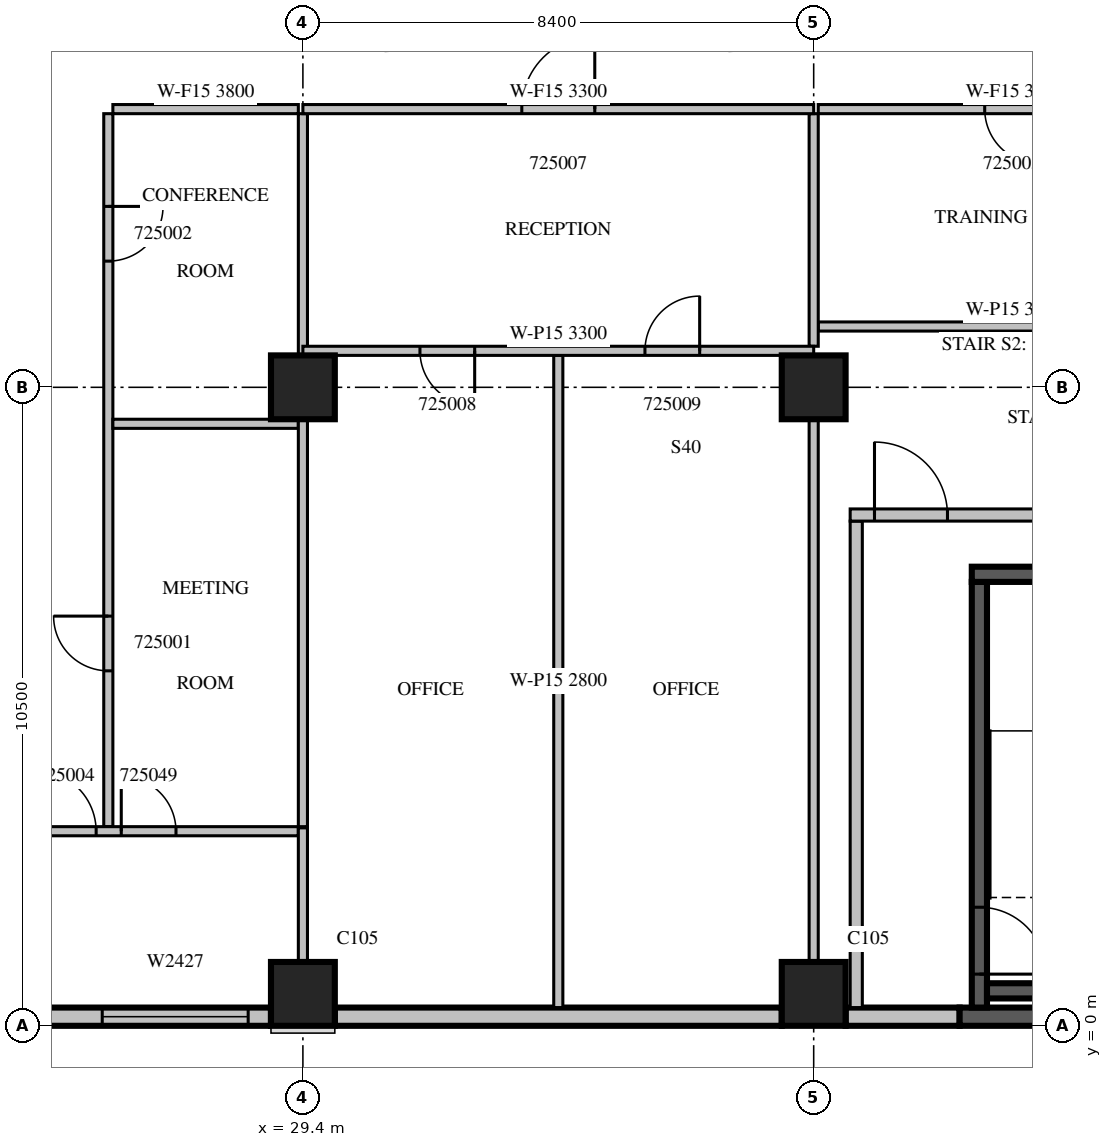
"""IFC4 building model, lengths in metres.
Left out: names, types, materials, properties, quantities, classifications, styles, units other than length and angle.
Written with IfcOpenShell. Run it as: python <this file> out.ifc"""

import sys

from ifc_helpers import new_model, si_unit, direction, frame, frame_2d, origin, origin_2d, place, context, subcontext, project, spatial, rectangle, extrude, source, transform, mapped, element, fill, save


model = new_model("IFC4")
c1 = context("Model", 3, precision=1e-05, world=origin(), true_north=direction((0.0, 1.0)))
c2 = subcontext(c1, "Body", "Model", "MODEL_VIEW")
j1 = project(units=[si_unit("LENGTHUNIT", "METRE"), si_unit("PLANEANGLEUNIT", "RADIAN")], contexts=[c1])
p1 = place(None, origin())
s1 = spatial("IfcSite", under=j1, at=p1, CompositionType="ELEMENT")
p2 = place(p1, origin())
s2 = spatial("IfcBuilding", under=s1, at=p2, CompositionType="ELEMENT")
p3 = place(p2, frame((0.0, 0.0, 116.1)))
s3 = spatial("IfcBuildingStorey", under=s2, at=p3, CompositionType="ELEMENT", Elevation=116.1)
m1 = source(origin(), c2, "Body", "SweptSolid", [
    extrude(rectangle(XDim=1.05, YDim=1.05, at=origin_2d()), origin(), (0.0, 0.0, 1.0), 4.2),
])
for number, where, z_axis, x_axis in (
    (1, (29.4, 0.525, 0.0), (0.0, 0.0, 1.0), (1.0, 0.0, 0.0)),
    (2, (37.8, 0.525, 0.0), (0.0, 0.0, 1.0), (1.0, 0.0, 0.0)),
    (3, (29.4, 10.5, 0.0), (0.0, 0.0, 1.0), (1.0, 0.0, 0.0)),
    (4, (37.8, 10.5, 0.0), (0.0, 0.0, 1.0), (1.0, 0.0, 0.0)),
):
    element("IfcColumn", number, at=place(p3, frame(where, z_axis=z_axis, x_axis=x_axis)), inside=s3, PredefinedType="COLUMN", context=c2, shape_type="MappedRepresentation", body=[
        mapped(m1, transform((0.0, 0.0, 0.0), scale=1.0)),
    ])
m2 = source(origin(), c2, "Body", "SweptSolid", [
    extrude(rectangle(XDim=7.35, YDim=0.3, at=frame_2d((3.675, 0.0))), origin(), (0.0, 0.0, 1.0), 3.8),
])
p4 = place(p3, frame((21.525, 0.15, 0.0), z_axis=(0.0, 0.0, 1.0), x_axis=(1.0, 0.0, 0.0)))
e5 = element("IfcWall", 5, at=p4, inside=s3, PredefinedType="STANDARD", context=c2, shape_type="MappedRepresentation", body=[
    mapped(m2, transform((0.0, 0.0, 0.0), scale=1.0)),
])
m3 = source(origin(), c2, "Body", "SweptSolid", [
    extrude(rectangle(XDim=2.4, YDim=2.7, at=frame_2d((1.2, 1.35))), frame((0.0, 0.16, 0.0), z_axis=(0.0, -1.0, 0.0), x_axis=(1.0, 0.0, 0.0)), (0.0, 0.0, 1.0), 0.32),
])
p5 = place(p4, frame((4.575, 0.0, 0.6)))
e6 = element("IfcOpeningElement", 6, at=p5, cuts=e5, PredefinedType="OPENING", context=c2, shape_type="MappedRepresentation", body=[
    mapped(m3, transform((0.0, 0.0, 0.0), scale=1.0)),
])
m4 = source(origin(), c2, "Body", "SweptSolid", [
    extrude(rectangle(XDim=1.0, YDim=2.1, at=frame_2d((0.5, 1.05))), frame((0.0, 0.16, 0.0), z_axis=(0.0, -1.0, 0.0), x_axis=(1.0, 0.0, 0.0)), (0.0, 0.0, 1.0), 0.32),
])
p6 = place(p4, frame((1.075, 0.0, 0.0)))
e7 = element("IfcOpeningElement", 7, at=p6, cuts=e5, PredefinedType="OPENING", context=c2, shape_type="MappedRepresentation", body=[
    mapped(m4, transform((0.0, 0.0, 0.0), scale=1.0)),
])
p7 = place(p3, frame((29.925, 0.15, 0.0), z_axis=(0.0, 0.0, 1.0), x_axis=(1.0, 0.0, 0.0)))
e8 = element("IfcWall", 8, at=p7, inside=s3, PredefinedType="STANDARD", context=c2, shape_type="MappedRepresentation", body=[
    mapped(m2, transform((0.0, 0.0, 0.0), scale=1.0)),
])
m5 = source(origin(), c2, "Body", "SweptSolid", [
    extrude(rectangle(XDim=1.875, YDim=0.3, at=frame_2d((0.938, 0.0))), origin(), (0.0, 0.0, 1.0), 3.8),
])
p8 = place(p3, frame((38.325, 0.15, 0.0), z_axis=(0.0, 0.0, 1.0), x_axis=(1.0, 0.0, 0.0)))
e9 = element("IfcWall", 9, at=p8, inside=s3, PredefinedType="STANDARD", context=c2, shape_type="MappedRepresentation", body=[
    mapped(m5, transform((0.0, 0.0, 0.0), scale=1.0)),
])
m6 = source(origin(), c2, "Body", "SweptSolid", [
    extrude(rectangle(XDim=3.8, YDim=0.3, at=frame_2d((1.9, 0.0))), origin(), (0.0, 0.0, 1.0), 3.8),
])
p9 = place(p3, frame((40.2, 0.15, 0.0), z_axis=(0.0, 0.0, 1.0), x_axis=(1.0, 0.0, 0.0)))
e10 = element("IfcWall", 10, at=p9, inside=s3, PredefinedType="SOLIDWALL", context=c2, shape_type="MappedRepresentation", body=[
    mapped(m6, transform((0.0, 0.0, 0.0), scale=1.0)),
])
m7 = source(origin(), c2, "Body", "SweptSolid", [
    extrude(rectangle(XDim=7.0, YDim=0.25, at=frame_2d((3.5, 0.0))), origin(), (0.0, 0.0, 1.0), 3.8),
])
p10 = place(p3, frame((40.525, 0.3, 0.0), z_axis=(0.0, 0.0, 1.0), x_axis=(0.0, 1.0, 0.0)))
e11 = element("IfcWall", 11, at=p10, inside=s3, PredefinedType="SOLIDWALL", context=c2, shape_type="MappedRepresentation", body=[
    mapped(m7, transform((0.0, 0.0, 0.0), scale=1.0)),
])
m8 = source(origin(), c2, "Body", "SweptSolid", [
    extrude(rectangle(XDim=1.1, YDim=2.1, at=frame_2d((0.55, 1.05))), frame((0.0, 0.135, 0.0), z_axis=(0.0, -1.0, 0.0), x_axis=(1.0, 0.0, 0.0)), (0.0, 0.0, 1.0), 0.27),
])
p11 = place(p10, frame((0.55, 0.0, 0.0)))
e12 = element("IfcOpeningElement", 12, at=p11, cuts=e11, PredefinedType="OPENING", context=c2, shape_type="MappedRepresentation", body=[
    mapped(m8, transform((0.0, 0.0, 0.0), scale=1.0)),
])
m9 = source(origin(), c2, "Body", "SweptSolid", [
    extrude(rectangle(XDim=3.45, YDim=0.25, at=frame_2d((1.725, 0.0))), origin(), (0.0, 0.0, 1.0), 3.8),
])
p12 = place(p3, frame((40.4, 7.425, 0.0), z_axis=(0.0, 0.0, 1.0), x_axis=(1.0, 0.0, 0.0)))
e13 = element("IfcWall", 13, at=p12, inside=s3, PredefinedType="SOLIDWALL", context=c2, shape_type="MappedRepresentation", body=[
    mapped(m9, transform((0.0, 0.0, 0.0), scale=1.0)),
])
m10 = source(origin(), c2, "Body", "SweptSolid", [
    extrude(rectangle(XDim=2.95, YDim=0.25, at=frame_2d((1.475, 0.0))), origin(), (0.0, 0.0, 1.0), 3.8),
])
p13 = place(p3, frame((40.65, 0.575, 0.0), z_axis=(0.0, 0.0, 1.0), x_axis=(1.0, 0.0, 0.0)))
e14 = element("IfcWall", 14, at=p13, inside=s3, PredefinedType="SOLIDWALL", context=c2, shape_type="MappedRepresentation", body=[
    mapped(m10, transform((0.0, 0.0, 0.0), scale=1.0)),
])
m11 = source(origin(), c2, "Body", "SweptSolid", [
    extrude(rectangle(XDim=8.0, YDim=0.2, at=frame_2d((4.0, 0.0))), origin(), (0.0, 0.0, 1.0), 3.8),
])
p14 = place(p3, frame((38.5, 0.3, 0.0), z_axis=(0.0, 0.0, 1.0), x_axis=(0.0, 1.0, 0.0)))
e15 = element("IfcWall", 15, at=p14, inside=s3, PredefinedType="PARTITIONING", context=c2, shape_type="MappedRepresentation", body=[
    mapped(m11, transform((0.0, 0.0, 0.0), scale=1.0)),
])
m12 = source(origin(), c2, "Body", "SweptSolid", [
    extrude(rectangle(XDim=5.45, YDim=0.2, at=frame_2d((2.725, 0.0))), origin(), (0.0, 0.0, 1.0), 3.8),
])
p15 = place(p3, frame((38.4, 8.4, 0.0), z_axis=(0.0, 0.0, 1.0), x_axis=(1.0, 0.0, 0.0)))
e16 = element("IfcWall", 16, at=p15, inside=s3, PredefinedType="PARTITIONING", context=c2, shape_type="MappedRepresentation", body=[
    mapped(m12, transform((0.0, 0.0, 0.0), scale=1.0)),
])
m13 = source(origin(), c2, "Body", "SweptSolid", [
    extrude(rectangle(XDim=1.2, YDim=2.1, at=frame_2d((0.6, 1.05))), frame((0.0, 0.11, 0.0), z_axis=(0.0, -1.0, 0.0), x_axis=(1.0, 0.0, 0.0)), (0.0, 0.0, 1.0), 0.22),
])
p16 = place(p15, frame((0.4, 0.0, 0.0)))
e17 = element("IfcOpeningElement", 17, at=p16, cuts=e16, PredefinedType="OPENING", context=c2, shape_type="MappedRepresentation", body=[
    mapped(m13, transform((0.0, 0.0, 0.0), scale=1.0)),
])
m14 = source(origin(), c2, "Body", "SweptSolid", [
    extrude(rectangle(XDim=0.9, YDim=2.1, at=frame_2d((0.45, 1.05))), frame((0.0, 0.11, 0.0), z_axis=(0.0, -1.0, 0.0), x_axis=(1.0, 0.0, 0.0)), (0.0, 0.0, 1.0), 0.22),
])
p17 = place(p15, frame((3.25, 0.0, 0.0)))
e18 = element("IfcOpeningElement", 18, at=p17, cuts=e16, PredefinedType="OPENING", context=c2, shape_type="MappedRepresentation", body=[
    mapped(m14, transform((0.0, 0.0, 0.0), scale=1.0)),
])
p18 = place(p3, frame((26.2, 15.0, 0.0), z_axis=(0.0, 0.0, 1.0), x_axis=(0.0, -1.0, 0.0)))
e19 = element("IfcWall", 19, at=p18, inside=s3, PredefinedType="PARTITIONING", context=c2, shape_type="SweptSolid", body=[
    extrude(rectangle(XDim=11.725, YDim=0.15, at=frame_2d((5.862, 0.0))), origin(), (0.0, 0.0, 1.0), 3.8),
])
m15 = source(origin(), c2, "Body", "SweptSolid", [
    extrude(rectangle(XDim=0.9, YDim=2.1, at=frame_2d((0.45, 1.05))), frame((0.0, 0.085, 0.0), z_axis=(0.0, -1.0, 0.0), x_axis=(1.0, 0.0, 0.0)), (0.0, 0.0, 1.0), 0.17),
])
p19 = place(p18, frame((8.262, 0.0, 0.0)))
e20 = element("IfcOpeningElement", 20, at=p19, cuts=e19, PredefinedType="OPENING", context=c2, shape_type="MappedRepresentation", body=[
    mapped(m15, transform((0.0, 0.0, 0.0), scale=1.0)),
])
p20 = place(p18, frame((1.525, 0.0, 0.0)))
e21 = element("IfcOpeningElement", 21, at=p20, cuts=e19, PredefinedType="OPENING", context=c2, shape_type="MappedRepresentation", body=[
    mapped(m15, transform((0.0, 0.0, 0.0), scale=1.0)),
])
p21 = place(p3, frame((29.325, 9.9, 0.0), z_axis=(0.0, 0.0, 1.0), x_axis=(-1.0, 0.0, 0.0)))
e22 = element("IfcWall", 22, at=p21, inside=s3, PredefinedType="PARTITIONING", context=c2, shape_type="SweptSolid", body=[
    extrude(rectangle(XDim=3.05, YDim=0.15, at=frame_2d((1.525, 0.0))), origin(), (0.0, 0.0, 1.0), 3.8),
])
m16 = source(origin(), c2, "Body", "SweptSolid", [
    extrude(rectangle(XDim=3.05, YDim=0.15, at=frame_2d((1.525, 0.0))), origin(), (0.0, 0.0, 1.0), 3.8),
])
p22 = place(p3, frame((29.325, 15.075, 0.0), z_axis=(0.0, 0.0, 1.0), x_axis=(-1.0, 0.0, 0.0)))
e23 = element("IfcWall", 23, at=p22, inside=s3, PredefinedType="PARTITIONING", context=c2, shape_type="MappedRepresentation", body=[
    mapped(m16, transform((0.0, 0.0, 0.0), scale=1.0)),
])
m17 = source(origin(), c2, "Body", "SweptSolid", [
    extrude(rectangle(XDim=6.701, YDim=0.15, at=frame_2d((3.35, 0.0))), origin(), (0.0, 0.0, 1.0), 3.8),
])
p23 = place(p3, frame((29.4, 3.275, 0.0), z_axis=(0.0, 0.0, 1.0), x_axis=(0.0, 1.0, 0.0)))
e24 = element("IfcWall", 24, at=p23, inside=s3, PredefinedType="PARTITIONING", context=c2, shape_type="MappedRepresentation", body=[
    mapped(m17, transform((0.0, 0.0, 0.0), scale=1.0)),
])
m18 = source(origin(), c2, "Body", "SweptSolid", [
    extrude(rectangle(XDim=3.976, YDim=0.15, at=frame_2d((1.988, 0.0))), origin(), (0.0, 0.0, 1.0), 3.8),
])
p24 = place(p3, frame((29.4, 11.024, 0.0), z_axis=(0.0, 0.0, 1.0), x_axis=(0.0, 1.0, 0.0)))
e25 = element("IfcWall", 25, at=p24, inside=s3, PredefinedType="PARTITIONING", context=c2, shape_type="MappedRepresentation", body=[
    mapped(m18, transform((0.0, 0.0, 0.0), scale=1.0)),
])
m19 = source(origin(), c2, "Body", "SweptSolid", [
    extrude(rectangle(XDim=7.325, YDim=0.15, at=frame_2d((3.663, 0.0))), origin(), (0.0, 0.0, 1.0), 3.8),
])
p25 = place(p3, frame((22.0, 3.2, 0.0), z_axis=(0.0, 0.0, 1.0), x_axis=(1.0, 0.0, 0.0)))
e26 = element("IfcWall", 26, at=p25, inside=s3, PredefinedType="PARTITIONING", context=c2, shape_type="MappedRepresentation", body=[
    mapped(m19, transform((0.0, 0.0, 0.0), scale=1.0)),
])
m20 = source(origin(), c2, "Body", "SweptSolid", [
    extrude(rectangle(XDim=1.0, YDim=2.1, at=frame_2d((0.5, 1.05))), frame((0.0, 0.085, 0.0), z_axis=(0.0, -1.0, 0.0), x_axis=(1.0, 0.0, 0.0)), (0.0, 0.0, 1.0), 0.17),
])
p26 = place(p25, frame((3.0, 0.0, 0.0)))
e27 = element("IfcOpeningElement", 27, at=p26, cuts=e26, PredefinedType="OPENING", context=c2, shape_type="MappedRepresentation", body=[
    mapped(m20, transform((0.0, 0.0, 0.0), scale=1.0)),
])
p27 = place(p25, frame((4.413, 0.0, 0.0)))
e28 = element("IfcOpeningElement", 28, at=p27, cuts=e26, PredefinedType="OPENING", context=c2, shape_type="MappedRepresentation", body=[
    mapped(m15, transform((0.0, 0.0, 0.0), scale=1.0)),
])
m21 = source(origin(), c2, "Body", "SweptSolid", [
    extrude(rectangle(XDim=6.45, YDim=0.15, at=frame_2d((3.225, 0.0))), origin(), (0.0, 0.0, 1.0), 3.3),
])
p28 = place(p3, frame((37.875, 11.5, 0.0), z_axis=(0.0, 0.0, 1.0), x_axis=(1.0, 0.0, 0.0)))
e29 = element("IfcWall", 29, at=p28, inside=s3, PredefinedType="PARTITIONING", context=c2, shape_type="MappedRepresentation", body=[
    mapped(m21, transform((0.0, 0.0, 0.0), scale=1.0)),
])
p29 = place(p3, frame((44.325, 15.075, 0.0), z_axis=(0.0, 0.0, 1.0), x_axis=(-1.0, 0.0, 0.0)))
e30 = element("IfcWall", 30, at=p29, inside=s3, PredefinedType="PARTITIONING", context=c2, shape_type="MappedRepresentation", body=[
    mapped(m21, transform((0.0, 0.0, 0.0), scale=1.0)),
])
p30 = place(p29, frame((2.812, 0.0, 0.0)))
e31 = element("IfcOpeningElement", 31, at=p30, cuts=e30, PredefinedType="OPENING", context=c2, shape_type="MappedRepresentation", body=[
    mapped(m15, transform((0.0, 0.0, 0.0), scale=1.0)),
])
p31 = place(p3, frame((33.6, 0.3, 0.0), z_axis=(0.0, 0.0, 1.0), x_axis=(0.0, 1.0, 0.0)))
e32 = element("IfcWall", 32, at=p31, inside=s3, PredefinedType="PARTITIONING", context=c2, shape_type="SweptSolid", body=[
    extrude(rectangle(XDim=10.725, YDim=0.15, at=frame_2d((5.362, 0.0))), origin(), (0.0, 0.0, 1.0), 2.8),
])
m22 = source(origin(), c2, "Body", "SweptSolid", [
    extrude(rectangle(XDim=2.206, YDim=0.15, at=frame_2d((1.103, 0.0))), origin(), (0.0, 0.0, 1.0), 3.8),
])
p32 = place(p3, frame((29.4, 1.049, 0.0), z_axis=(0.0, 0.0, 1.0), x_axis=(0.0, 1.0, 0.0)))
e33 = element("IfcWall", 33, at=p32, inside=s3, PredefinedType="PARTITIONING", context=c2, shape_type="MappedRepresentation", body=[
    mapped(m22, transform((0.0, 0.0, 0.0), scale=1.0)),
])
m23 = source(origin(), c2, "Body", "SweptSolid", [
    extrude(rectangle(XDim=8.927, YDim=0.15, at=frame_2d((4.463, 0.0))), origin(), (0.0, 0.0, 1.0), 3.8),
])
p33 = place(p3, frame((37.8, 1.049, 0.0), z_axis=(0.0, 0.0, 1.0), x_axis=(0.0, 1.0, 0.0)))
e34 = element("IfcWall", 34, at=p33, inside=s3, PredefinedType="PARTITIONING", context=c2, shape_type="MappedRepresentation", body=[
    mapped(m23, transform((0.0, 0.0, 0.0), scale=1.0)),
])
m24 = source(origin(), c2, "Body", "SweptSolid", [
    extrude(rectangle(XDim=3.825, YDim=0.15, at=frame_2d((1.913, 0.0))), origin(), (0.0, 0.0, 1.0), 3.8),
])
p34 = place(p3, frame((37.8, 11.175, 0.0), z_axis=(0.0, 0.0, 1.0), x_axis=(0.0, 1.0, 0.0)))
e35 = element("IfcWall", 35, at=p34, inside=s3, PredefinedType="PARTITIONING", context=c2, shape_type="MappedRepresentation", body=[
    mapped(m24, transform((0.0, 0.0, 0.0), scale=1.0)),
])
m25 = source(origin(), c2, "Body", "SweptSolid", [
    extrude(rectangle(XDim=8.4, YDim=0.15, at=frame_2d((4.2, 0.0))), origin(), (0.0, 0.0, 1.0), 3.3),
])
p35 = place(p3, frame((37.8, 11.1, 0.0), z_axis=(0.0, 0.0, 1.0), x_axis=(-1.0, 0.0, 0.0)))
e36 = element("IfcWall", 36, at=p35, inside=s3, PredefinedType="PARTITIONING", context=c2, shape_type="MappedRepresentation", body=[
    mapped(m25, transform((0.0, 0.0, 0.0), scale=1.0)),
])
p36 = place(p35, frame((5.575, 0.0, 0.0)))
e37 = element("IfcOpeningElement", 37, at=p36, cuts=e36, PredefinedType="OPENING", context=c2, shape_type="MappedRepresentation", body=[
    mapped(m15, transform((0.0, 0.0, 0.0), scale=1.0)),
])
p37 = place(p35, frame((1.875, 0.0, 0.0)))
e38 = element("IfcOpeningElement", 38, at=p37, cuts=e36, PredefinedType="OPENING", context=c2, shape_type="MappedRepresentation", body=[
    mapped(m15, transform((0.0, 0.0, 0.0), scale=1.0)),
])
p38 = place(p3, frame((37.8, 15.075, 0.0), z_axis=(0.0, 0.0, 1.0), x_axis=(-1.0, 0.0, 0.0)))
e39 = element("IfcWall", 39, at=p38, inside=s3, PredefinedType="PARTITIONING", context=c2, shape_type="MappedRepresentation", body=[
    mapped(m25, transform((0.0, 0.0, 0.0), scale=1.0)),
])
m26 = source(origin(), c2, "Body", "SweptSolid", [
    extrude(rectangle(XDim=1.2, YDim=2.1, at=frame_2d((0.6, 1.05))), frame((0.0, 0.085, 0.0), z_axis=(0.0, -1.0, 0.0), x_axis=(1.0, 0.0, 0.0)), (0.0, 0.0, 1.0), 0.17),
])
p39 = place(p38, frame((3.6, 0.0, 0.0)))
e40 = element("IfcOpeningElement", 40, at=p39, cuts=e39, PredefinedType="OPENING", context=c2, shape_type="MappedRepresentation", body=[
    mapped(m26, transform((0.0, 0.0, 0.0), scale=1.0)),
])
m27 = source(origin(), c2, "Body", "SweptSolid", [
    extrude(rectangle(XDim=2.4, YDim=2.7, at=frame_2d((1.2, 1.35))), frame((0.0, 0.03, 0.0), z_axis=(0.0, -1.0, 0.0), x_axis=(1.0, 0.0, 0.0)), (0.0, 0.0, 1.0), 0.06),
])
p40 = place(p5, origin())
e41 = element("IfcWindow", 41, at=p40, inside=s3, PartitioningType="SINGLE_PANEL", PredefinedType="WINDOW", context=c2, shape_type="MappedRepresentation", body=[
    mapped(m27, transform((0.0, 0.0, 0.0), scale=1.0)),
])
fill(e6, e41)
m28 = source(origin(), c2, "Body", "SweptSolid", [
    extrude(rectangle(XDim=1.1, YDim=2.1, at=frame_2d((0.55, 1.05))), frame((0.0, 0.025, 0.0), z_axis=(0.0, -1.0, 0.0), x_axis=(1.0, 0.0, 0.0)), (0.0, 0.0, 1.0), 0.05),
])
p41 = place(p11, origin())
e42 = element("IfcDoor", 42, at=p41, inside=s3, OperationType="SINGLE_SWING_RIGHT", PredefinedType="DOOR", context=c2, shape_type="MappedRepresentation", body=[
    mapped(m28, transform((0.0, 0.0, 0.0), scale=1.0)),
])
fill(e12, e42)
m29 = source(origin(), c2, "Body", "SweptSolid", [
    extrude(rectangle(XDim=1.2, YDim=2.1, at=frame_2d((0.6, 1.05))), frame((0.0, 0.025, 0.0), z_axis=(0.0, -1.0, 0.0), x_axis=(1.0, 0.0, 0.0)), (0.0, 0.0, 1.0), 0.05),
])
p42 = place(p16, origin())
e43 = element("IfcDoor", 43, at=p42, inside=s3, OperationType="SINGLE_SWING_LEFT", PredefinedType="DOOR", context=c2, shape_type="MappedRepresentation", body=[
    mapped(m29, transform((0.0, 0.0, 0.0), scale=1.0)),
])
fill(e17, e43)
m30 = source(origin(), c2, "Body", "SweptSolid", [
    extrude(rectangle(XDim=0.9, YDim=2.1, at=frame_2d((0.45, 1.05))), frame((0.0, 0.025, 0.0), z_axis=(0.0, -1.0, 0.0), x_axis=(1.0, 0.0, 0.0)), (0.0, 0.0, 1.0), 0.05),
])
p43 = place(p19, origin())
e44 = element("IfcDoor", 44, at=p43, inside=s3, OperationType="SINGLE_SWING_RIGHT", PredefinedType="DOOR", context=c2, shape_type="MappedRepresentation", body=[
    mapped(m30, transform((0.0, 0.0, 0.0), scale=1.0)),
])
fill(e20, e44)
p44 = place(p20, origin())
e45 = element("IfcDoor", 45, at=p44, inside=s3, OperationType="SINGLE_SWING_LEFT", PredefinedType="DOOR", context=c2, shape_type="MappedRepresentation", body=[
    mapped(m30, transform((0.0, 0.0, 0.0), scale=1.0)),
])
fill(e21, e45)
m31 = source(origin(), c2, "Body", "SweptSolid", [
    extrude(rectangle(XDim=1.0, YDim=2.1, at=frame_2d((0.5, 1.05))), frame((0.0, 0.025, 0.0), z_axis=(0.0, -1.0, 0.0), x_axis=(1.0, 0.0, 0.0)), (0.0, 0.0, 1.0), 0.05),
])
p45 = place(p26, origin())
e46 = element("IfcDoor", 46, at=p45, inside=s3, OperationType="SINGLE_SWING_LEFT", PredefinedType="DOOR", context=c2, shape_type="MappedRepresentation", body=[
    mapped(m31, transform((0.0, 0.0, 0.0), scale=1.0)),
])
fill(e27, e46)
p46 = place(p30, origin())
e47 = element("IfcDoor", 47, at=p46, inside=s3, OperationType="SINGLE_SWING_LEFT", PredefinedType="DOOR", context=c2, shape_type="MappedRepresentation", body=[
    mapped(m30, transform((0.0, 0.0, 0.0), scale=1.0)),
])
fill(e31, e47)
p47 = place(p39, origin())
e48 = element("IfcDoor", 48, at=p47, inside=s3, OperationType="SINGLE_SWING_RIGHT", PredefinedType="DOOR", context=c2, shape_type="MappedRepresentation", body=[
    mapped(m29, transform((0.0, 0.0, 0.0), scale=1.0)),
])
fill(e40, e48)
p48 = place(p36, origin())
e49 = element("IfcDoor", 49, at=p48, inside=s3, OperationType="SINGLE_SWING_LEFT", PredefinedType="DOOR", context=c2, shape_type="MappedRepresentation", body=[
    mapped(m30, transform((0.0, 0.0, 0.0), scale=1.0)),
])
fill(e37, e49)
p49 = place(p37, origin())
e50 = element("IfcDoor", 50, at=p49, inside=s3, OperationType="SINGLE_SWING_RIGHT", PredefinedType="DOOR", context=c2, shape_type="MappedRepresentation", body=[
    mapped(m30, transform((0.0, 0.0, 0.0), scale=1.0)),
])
fill(e38, e50)
p50 = place(p27, origin())
e51 = element("IfcDoor", 51, at=p50, inside=s3, OperationType="SINGLE_SWING_LEFT", PredefinedType="DOOR", context=c2, shape_type="MappedRepresentation", body=[
    mapped(m30, transform((0.0, 0.0, 0.0), scale=1.0)),
])
fill(e28, e51)
save(model, sys.argv[1])
